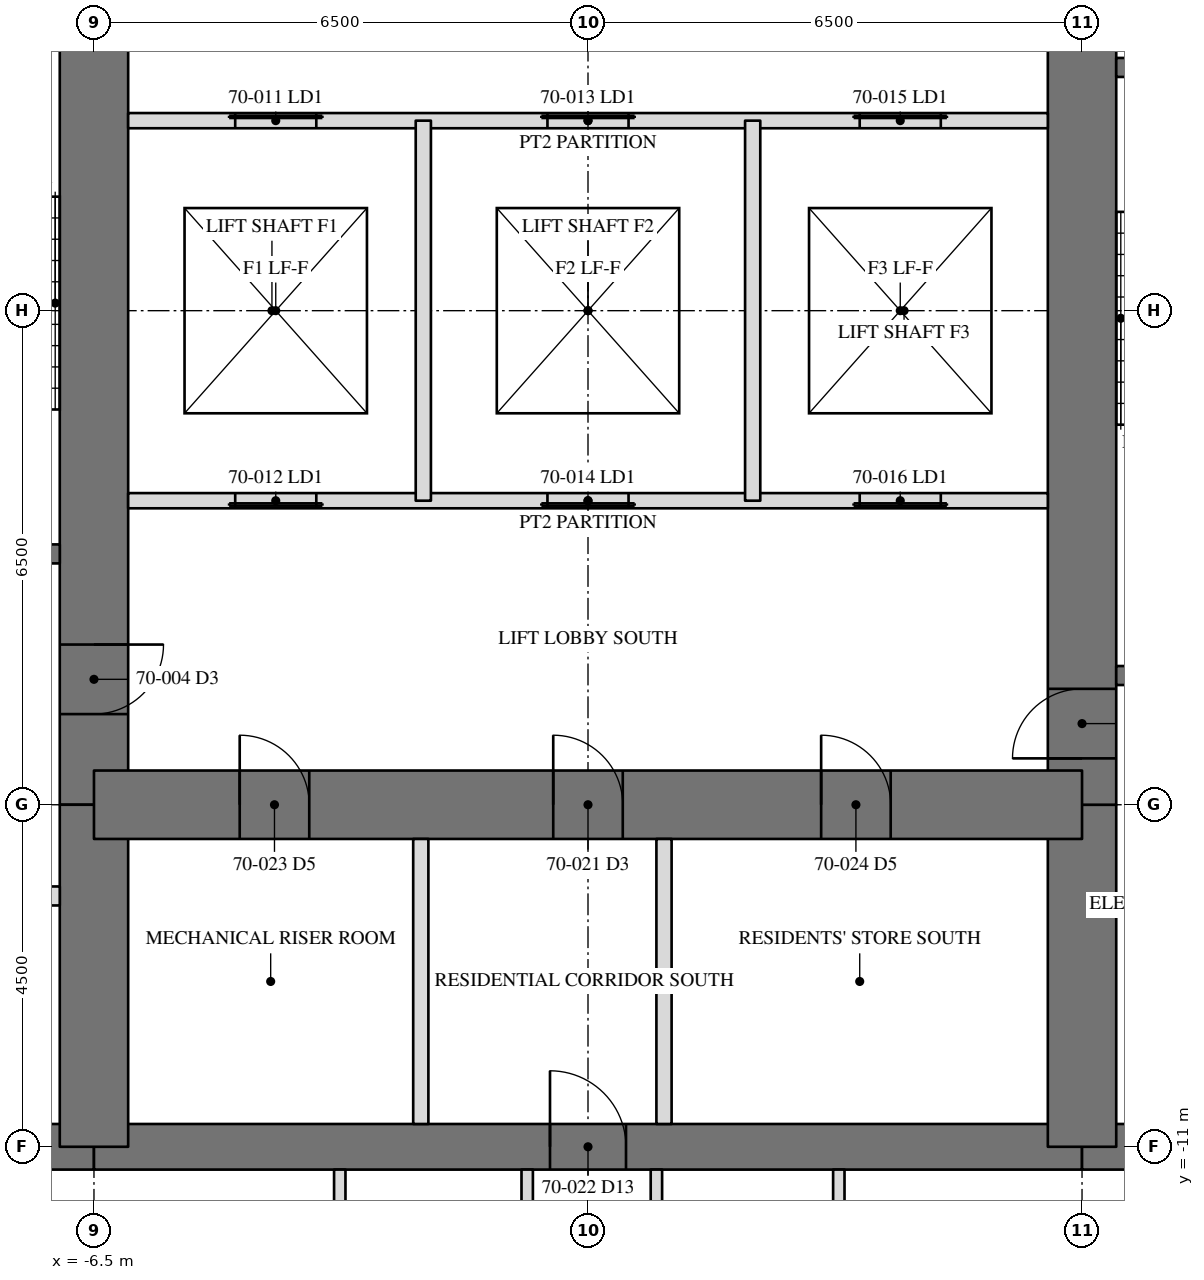
"""IFC4 building model, lengths in metres.
Left out: names, types, materials, properties, quantities, classifications, styles, units other than length and angle.
Written with IfcOpenShell. Run it as: python <this file> out.ifc"""

import sys

from ifc_helpers import new_model, si_unit, direction, frame, frame_2d, origin, place, context, subcontext, project, spatial, rectangle, extrude, element, fill, save


model = new_model("IFC4")
c1 = context("Model", 3, precision=1e-05, world=origin(), true_north=direction((0.0, 1.0)))
c2 = subcontext(c1, "Body", "Model", "MODEL_VIEW")
j1 = project(units=[si_unit("LENGTHUNIT", "METRE"), si_unit("PLANEANGLEUNIT", "RADIAN")], contexts=[c1])
p1 = place(None, origin())
s1 = spatial("IfcSite", under=j1, at=p1, CompositionType="ELEMENT")
p2 = place(p1, origin())
s2 = spatial("IfcBuilding", under=s1, at=p2, CompositionType="ELEMENT")
p3 = place(p2, frame((0.0, 0.0, 284.8)))
s3 = spatial("IfcBuildingStorey", under=s2, at=p3, CompositionType="ELEMENT", Elevation=284.8)
p4 = place(p3, frame((-11.0, -11.0, 0.0), z_axis=(0.0, 0.0, 1.0), x_axis=(1.0, 0.0, 0.0)))
e1 = element("IfcWall", 1, at=p4, inside=s3, PredefinedType="SHEAR", context=c2, shape_type="SweptSolid", body=[
    extrude(rectangle(XDim=4.5, YDim=0.6, at=frame_2d((2.25, 0.0))), origin(), (0.0, 0.0, 1.0), 3.6),
])
p5 = place(p3, frame((-6.5, -11.0, 0.0), z_axis=(0.0, 0.0, 1.0), x_axis=(1.0, 0.0, 0.0)))
e2 = element("IfcWall", 2, at=p5, inside=s3, PredefinedType="SHEAR", context=c2, shape_type="SweptSolid", body=[
    extrude(rectangle(XDim=13.0, YDim=0.6, at=frame_2d((6.5, 0.0))), origin(), (0.0, 0.0, 1.0), 3.6),
])
p6 = place(p5, frame((6.0, 0.0, 0.0)))
e3 = element("IfcOpeningElement", 3, at=p6, cuts=e2, PredefinedType="OPENING", context=c2, shape_type="SweptSolid", body=[
    extrude(rectangle(XDim=1.0, YDim=2.134, at=frame_2d((0.5, 1.067))), frame((0.0, 0.31, 0.0), z_axis=(0.0, -1.0, 0.0), x_axis=(1.0, 0.0, 0.0)), (0.0, 0.0, 1.0), 0.62),
])
p7 = place(p3, frame((6.5, -11.0, 0.0), z_axis=(0.0, 0.0, 1.0), x_axis=(1.0, 0.0, 0.0)))
e4 = element("IfcWall", 4, at=p7, inside=s3, PredefinedType="SHEAR", context=c2, shape_type="SweptSolid", body=[
    extrude(rectangle(XDim=4.5, YDim=0.6, at=frame_2d((2.25, 0.0))), origin(), (0.0, 0.0, 1.0), 3.6),
])
p8 = place(p3, frame((6.5, -11.0, 0.0), z_axis=(0.0, 0.0, 1.0), x_axis=(0.0, 1.0, 0.0)))
e5 = element("IfcWall", 5, at=p8, inside=s3, PredefinedType="SHEAR", context=c2, shape_type="SweptSolid", body=[
    extrude(rectangle(XDim=4.5, YDim=0.9, at=frame_2d((2.25, 0.0))), origin(), (0.0, 0.0, 1.0), 3.6),
])
p9 = place(p3, frame((6.5, -6.5, 0.0), z_axis=(0.0, 0.0, 1.0), x_axis=(0.0, 1.0, 0.0)))
e6 = element("IfcWall", 6, at=p9, inside=s3, PredefinedType="SHEAR", context=c2, shape_type="SweptSolid", body=[
    extrude(rectangle(XDim=13.0, YDim=0.9, at=frame_2d((6.5, 0.0))), origin(), (0.0, 0.0, 1.0), 3.6),
])
p10 = place(p9, frame((10.893, 0.0, 0.0)))
e7 = element("IfcOpeningElement", 7, at=p10, cuts=e6, PredefinedType="OPENING", context=c2, shape_type="SweptSolid", body=[
    extrude(rectangle(XDim=0.915, YDim=2.134, at=frame_2d((0.458, 1.067))), frame((0.0, 0.46, 0.0), z_axis=(0.0, -1.0, 0.0), x_axis=(1.0, 0.0, 0.0)), (0.0, 0.0, 1.0), 0.92),
])
p11 = place(p9, frame((0.61, 0.0, 0.0)))
e8 = element("IfcOpeningElement", 8, at=p11, cuts=e6, PredefinedType="OPENING", context=c2, shape_type="SweptSolid", body=[
    extrude(rectangle(XDim=0.915, YDim=2.134, at=frame_2d((0.458, 1.067))), frame((0.0, 0.46, 0.0), z_axis=(0.0, -1.0, 0.0), x_axis=(1.0, 0.0, 0.0)), (0.0, 0.0, 1.0), 0.92),
])
p12 = place(p3, frame((-6.5, 6.5, 0.0), z_axis=(0.0, 0.0, 1.0), x_axis=(0.0, -1.0, 0.0)))
e9 = element("IfcWall", 9, at=p12, inside=s3, PredefinedType="SHEAR", context=c2, shape_type="SweptSolid", body=[
    extrude(rectangle(XDim=13.0, YDim=0.9, at=frame_2d((6.5, 0.0))), origin(), (0.0, 0.0, 1.0), 3.6),
])
p13 = place(p12, frame((10.893, 0.0, 0.0)))
e10 = element("IfcOpeningElement", 10, at=p13, cuts=e9, PredefinedType="OPENING", context=c2, shape_type="SweptSolid", body=[
    extrude(rectangle(XDim=0.915, YDim=2.134, at=frame_2d((0.458, 1.067))), frame((0.0, 0.46, 0.0), z_axis=(0.0, -1.0, 0.0), x_axis=(1.0, 0.0, 0.0)), (0.0, 0.0, 1.0), 0.92),
])
p14 = place(p12, frame((0.61, 0.0, 0.0)))
e11 = element("IfcOpeningElement", 11, at=p14, cuts=e9, PredefinedType="OPENING", context=c2, shape_type="SweptSolid", body=[
    extrude(rectangle(XDim=0.915, YDim=2.134, at=frame_2d((0.458, 1.067))), frame((0.0, 0.46, 0.0), z_axis=(0.0, -1.0, 0.0), x_axis=(1.0, 0.0, 0.0)), (0.0, 0.0, 1.0), 0.92),
])
p15 = place(p3, frame((-6.5, -6.5, 0.0), z_axis=(0.0, 0.0, 1.0), x_axis=(0.0, -1.0, 0.0)))
e12 = element("IfcWall", 12, at=p15, inside=s3, PredefinedType="SHEAR", context=c2, shape_type="SweptSolid", body=[
    extrude(rectangle(XDim=4.5, YDim=0.9, at=frame_2d((2.25, 0.0))), origin(), (0.0, 0.0, 1.0), 3.6),
])
p16 = place(p3, frame((-6.5, -6.5, 0.0), z_axis=(0.0, 0.0, 1.0), x_axis=(1.0, 0.0, 0.0)))
e13 = element("IfcWall", 13, at=p16, inside=s3, PredefinedType="SHEAR", context=c2, shape_type="SweptSolid", body=[
    extrude(rectangle(XDim=13.0, YDim=0.9, at=frame_2d((6.5, 0.0))), origin(), (0.0, 0.0, 1.0), 3.6),
])
p17 = place(p16, frame((6.042, 0.0, 0.0)))
e14 = element("IfcOpeningElement", 14, at=p17, cuts=e13, PredefinedType="OPENING", context=c2, shape_type="SweptSolid", body=[
    extrude(rectangle(XDim=0.915, YDim=2.134, at=frame_2d((0.458, 1.067))), frame((0.0, 0.46, 0.0), z_axis=(0.0, -1.0, 0.0), x_axis=(1.0, 0.0, 0.0)), (0.0, 0.0, 1.0), 0.92),
])
p18 = place(p16, frame((1.917, 0.0, 0.0)))
e15 = element("IfcOpeningElement", 15, at=p18, cuts=e13, PredefinedType="OPENING", context=c2, shape_type="SweptSolid", body=[
    extrude(rectangle(XDim=0.915, YDim=2.134, at=frame_2d((0.458, 1.067))), frame((0.0, 0.46, 0.0), z_axis=(0.0, -1.0, 0.0), x_axis=(1.0, 0.0, 0.0)), (0.0, 0.0, 1.0), 0.92),
])
p19 = place(p16, frame((9.567, 0.0, 0.0)))
e16 = element("IfcOpeningElement", 16, at=p19, cuts=e13, PredefinedType="OPENING", context=c2, shape_type="SweptSolid", body=[
    extrude(rectangle(XDim=0.915, YDim=2.134, at=frame_2d((0.458, 1.067))), frame((0.0, 0.46, 0.0), z_axis=(0.0, -1.0, 0.0), x_axis=(1.0, 0.0, 0.0)), (0.0, 0.0, 1.0), 0.92),
])
p20 = place(p3, frame((6.95, -4.8, 0.0), z_axis=(0.0, 0.0, 1.0), x_axis=(1.0, 0.0, 0.0)))
e17 = element("IfcWall", 17, at=p20, inside=s3, PredefinedType="SOLIDWALL", context=c2, shape_type="SweptSolid", body=[
    extrude(rectangle(XDim=3.75, YDim=0.25, at=frame_2d((1.875, 0.0))), origin(), (0.0, 0.0, 1.0), 3.41),
])
p21 = place(p3, frame((6.95, 3.2, 0.0), z_axis=(0.0, 0.0, 1.0), x_axis=(1.0, 0.0, 0.0)))
e18 = element("IfcWall", 18, at=p21, inside=s3, PredefinedType="SOLIDWALL", context=c2, shape_type="SweptSolid", body=[
    extrude(rectangle(XDim=3.75, YDim=0.25, at=frame_2d((1.875, 0.0))), origin(), (0.0, 0.0, 1.0), 3.41),
])
p22 = place(p21, frame((1.342, 0.0, 0.0)))
e19 = element("IfcOpeningElement", 19, at=p22, cuts=e18, PredefinedType="OPENING", context=c2, shape_type="SweptSolid", body=[
    extrude(rectangle(XDim=1.067, YDim=2.134, at=frame_2d((0.533, 1.067))), frame((0.0, 0.135, 0.0), z_axis=(0.0, -1.0, 0.0), x_axis=(1.0, 0.0, 0.0)), (0.0, 0.0, 1.0), 0.27),
])
p23 = place(p3, frame((-6.95, -3.2, 0.0), z_axis=(0.0, 0.0, 1.0), x_axis=(-1.0, 0.0, 0.0)))
e20 = element("IfcWall", 20, at=p23, inside=s3, PredefinedType="SOLIDWALL", context=c2, shape_type="SweptSolid", body=[
    extrude(rectangle(XDim=3.75, YDim=0.25, at=frame_2d((1.875, 0.0))), origin(), (0.0, 0.0, 1.0), 3.41),
])
p24 = place(p23, frame((1.342, 0.0, 0.0)))
e21 = element("IfcOpeningElement", 21, at=p24, cuts=e20, PredefinedType="OPENING", context=c2, shape_type="SweptSolid", body=[
    extrude(rectangle(XDim=1.067, YDim=2.134, at=frame_2d((0.533, 1.067))), frame((0.0, 0.135, 0.0), z_axis=(0.0, -1.0, 0.0), x_axis=(1.0, 0.0, 0.0)), (0.0, 0.0, 1.0), 0.27),
])
p25 = place(p3, frame((-6.95, -7.7, 0.0), z_axis=(0.0, 0.0, 1.0), x_axis=(-1.0, 0.0, 0.0)))
e22 = element("IfcWall", 22, at=p25, inside=s3, PredefinedType="PARTITIONING", context=c2, shape_type="SweptSolid", body=[
    extrude(rectangle(XDim=3.75, YDim=0.25, at=frame_2d((1.875, 0.0))), origin(), (0.0, 0.0, 1.0), 3.41),
])
p26 = place(p25, frame((0.45, 0.0, 0.0)))
e23 = element("IfcOpeningElement", 23, at=p26, cuts=e22, PredefinedType="OPENING", context=c2, shape_type="SweptSolid", body=[
    extrude(rectangle(XDim=1.219, YDim=2.134, at=frame_2d((0.609, 1.067))), frame((0.0, 0.135, 0.0), z_axis=(0.0, -1.0, 0.0), x_axis=(1.0, 0.0, 0.0)), (0.0, 0.0, 1.0), 0.27),
])
p27 = place(p3, frame((-6.05, 2.5, 0.0), z_axis=(0.0, 0.0, 1.0), x_axis=(1.0, 0.0, 0.0)))
e24 = element("IfcWall", 24, at=p27, inside=s3, PredefinedType="PARTITIONING", context=c2, shape_type="SweptSolid", body=[
    extrude(rectangle(XDim=12.1, YDim=0.2, at=frame_2d((6.05, 0.0))), origin(), (0.0, 0.0, 1.0), 3.41),
])
p28 = place(p27, frame((1.408, 0.0, 0.0)))
e25 = element("IfcOpeningElement", 25, at=p28, cuts=e24, PredefinedType="OPENING", context=c2, shape_type="SweptSolid", body=[
    extrude(rectangle(XDim=1.067, YDim=2.134, at=frame_2d((0.533, 1.067))), frame((0.0, 0.11, 0.0), z_axis=(0.0, -1.0, 0.0), x_axis=(1.0, 0.0, 0.0)), (0.0, 0.0, 1.0), 0.22),
])
p29 = place(p27, frame((5.517, 0.0, 0.0)))
e26 = element("IfcOpeningElement", 26, at=p29, cuts=e24, PredefinedType="OPENING", context=c2, shape_type="SweptSolid", body=[
    extrude(rectangle(XDim=1.067, YDim=2.134, at=frame_2d((0.533, 1.067))), frame((0.0, 0.11, 0.0), z_axis=(0.0, -1.0, 0.0), x_axis=(1.0, 0.0, 0.0)), (0.0, 0.0, 1.0), 0.22),
])
p30 = place(p27, frame((9.625, 0.0, 0.0)))
e27 = element("IfcOpeningElement", 27, at=p30, cuts=e24, PredefinedType="OPENING", context=c2, shape_type="SweptSolid", body=[
    extrude(rectangle(XDim=1.067, YDim=2.134, at=frame_2d((0.533, 1.067))), frame((0.0, 0.11, 0.0), z_axis=(0.0, -1.0, 0.0), x_axis=(1.0, 0.0, 0.0)), (0.0, 0.0, 1.0), 0.22),
])
p31 = place(p3, frame((6.05, -2.5, 0.0), z_axis=(0.0, 0.0, 1.0), x_axis=(-1.0, 0.0, 0.0)))
e28 = element("IfcWall", 28, at=p31, inside=s3, PredefinedType="PARTITIONING", context=c2, shape_type="SweptSolid", body=[
    extrude(rectangle(XDim=12.1, YDim=0.2, at=frame_2d((6.05, 0.0))), origin(), (0.0, 0.0, 1.0), 3.41),
])
p32 = place(p31, frame((9.625, 0.0, 0.0)))
e29 = element("IfcOpeningElement", 29, at=p32, cuts=e28, PredefinedType="OPENING", context=c2, shape_type="SweptSolid", body=[
    extrude(rectangle(XDim=1.067, YDim=2.134, at=frame_2d((0.533, 1.067))), frame((0.0, 0.11, 0.0), z_axis=(0.0, -1.0, 0.0), x_axis=(1.0, 0.0, 0.0)), (0.0, 0.0, 1.0), 0.22),
])
p33 = place(p31, frame((5.517, 0.0, 0.0)))
e30 = element("IfcOpeningElement", 30, at=p33, cuts=e28, PredefinedType="OPENING", context=c2, shape_type="SweptSolid", body=[
    extrude(rectangle(XDim=1.067, YDim=2.134, at=frame_2d((0.533, 1.067))), frame((0.0, 0.11, 0.0), z_axis=(0.0, -1.0, 0.0), x_axis=(1.0, 0.0, 0.0)), (0.0, 0.0, 1.0), 0.22),
])
p34 = place(p31, frame((1.408, 0.0, 0.0)))
e31 = element("IfcOpeningElement", 31, at=p34, cuts=e28, PredefinedType="OPENING", context=c2, shape_type="SweptSolid", body=[
    extrude(rectangle(XDim=1.067, YDim=2.134, at=frame_2d((0.533, 1.067))), frame((0.0, 0.11, 0.0), z_axis=(0.0, -1.0, 0.0), x_axis=(1.0, 0.0, 0.0)), (0.0, 0.0, 1.0), 0.22),
])
for number, where, z_axis, x_axis in (
    (32, (-2.167, -2.5, 0.0), (0.0, 0.0, 1.0), (0.0, 1.0, 0.0)),
    (33, (2.167, -2.5, 0.0), (0.0, 0.0, 1.0), (0.0, 1.0, 0.0)),
):
    element("IfcWall", number, at=place(p3, frame(where, z_axis=z_axis, x_axis=x_axis)), inside=s3, PredefinedType="PARTITIONING", context=c2, shape_type="SweptSolid", body=[
        extrude(rectangle(XDim=5.0, YDim=0.2, at=frame_2d((2.5, 0.0))), origin(), (0.0, 0.0, 1.0), 3.41),
    ])
for number, where, z_axis, x_axis in (
    (34, (-2.2, -6.95, 0.0), (0.0, 0.0, 1.0), (0.0, -1.0, 0.0)),
    (35, (1.0, -6.95, 0.0), (0.0, 0.0, 1.0), (0.0, -1.0, 0.0)),
):
    element("IfcWall", number, at=place(p3, frame(where, z_axis=z_axis, x_axis=x_axis)), inside=s3, PredefinedType="PARTITIONING", context=c2, shape_type="SweptSolid", body=[
        extrude(rectangle(XDim=3.75, YDim=0.2, at=frame_2d((1.875, 0.0))), origin(), (0.0, 0.0, 1.0), 3.41),
    ])
p35 = place(p3, frame((-3.266, -11.3, 0.0), z_axis=(0.0, 0.0, 1.0), x_axis=(0.0, -1.0, 0.0)))
e36 = element("IfcWall", 36, at=p35, inside=s3, PredefinedType="PARTITIONING", context=c2, shape_type="SweptSolid", body=[
    extrude(rectangle(XDim=5.615, YDim=0.15, at=frame_2d((2.808, 0.0))), origin(), (0.0, 0.0, 1.0), 2.709),
])
p36 = place(p35, frame((3.242, 0.0, 0.0)))
e37 = element("IfcOpeningElement", 37, at=p36, cuts=e36, PredefinedType="OPENING", context=c2, shape_type="SweptSolid", body=[
    extrude(rectangle(XDim=0.915, YDim=2.134, at=frame_2d((0.458, 1.067))), frame((0.0, 0.085, 0.0), z_axis=(0.0, -1.0, 0.0), x_axis=(1.0, 0.0, 0.0)), (0.0, 0.0, 1.0), 0.17),
])
p37 = place(p3, frame((0.9, -11.3, 0.0), z_axis=(0.0, 0.0, 1.0), x_axis=(0.0, -1.0, 0.0)))
e38 = element("IfcWall", 38, at=p37, inside=s3, PredefinedType="PARTITIONING", context=c2, shape_type="SweptSolid", body=[
    extrude(rectangle(XDim=2.725, YDim=0.15, at=frame_2d((1.362, 0.0))), origin(), (0.0, 0.0, 1.0), 3.41),
])
p38 = place(p3, frame((3.3, -11.3, 0.0), z_axis=(0.0, 0.0, 1.0), x_axis=(0.0, -1.0, 0.0)))
e39 = element("IfcWall", 39, at=p38, inside=s3, PredefinedType="PARTITIONING", context=c2, shape_type="SweptSolid", body=[
    extrude(rectangle(XDim=2.725, YDim=0.15, at=frame_2d((1.362, 0.0))), origin(), (0.0, 0.0, 1.0), 2.709),
])
p39 = place(p3, frame((-0.8, -11.3, 0.0), z_axis=(0.0, 0.0, 1.0), x_axis=(0.0, -1.0, 0.0)))
e40 = element("IfcWall", 40, at=p39, inside=s3, PredefinedType="PARTITIONING", context=c2, shape_type="SweptSolid", body=[
    extrude(rectangle(XDim=2.375, YDim=0.15, at=frame_2d((1.188, 0.0))), origin(), (0.0, 0.0, 1.0), 3.41),
])
p40 = place(p13, origin())
e41 = element("IfcDoor", 41, at=p40, inside=s3, OperationType="SINGLE_SWING_RIGHT", PredefinedType="DOOR", context=c2, shape_type="SweptSolid", body=[
    extrude(rectangle(XDim=0.915, YDim=2.134, at=frame_2d((0.458, 1.067))), frame((0.0, -0.375, 0.0), z_axis=(0.0, -1.0, 0.0), x_axis=(1.0, 0.0, 0.0)), (0.0, 0.0, 1.0), 0.05),
])
fill(e10, e41)
p41 = place(p11, origin())
e42 = element("IfcDoor", 42, at=p41, inside=s3, OperationType="SINGLE_SWING_RIGHT", PredefinedType="DOOR", context=c2, shape_type="SweptSolid", body=[
    extrude(rectangle(XDim=0.915, YDim=2.134, at=frame_2d((0.458, 1.067))), frame((0.0, -0.375, 0.0), z_axis=(0.0, -1.0, 0.0), x_axis=(1.0, 0.0, 0.0)), (0.0, 0.0, 1.0), 0.05),
])
fill(e8, e42)
p42 = place(p28, origin())
e43 = element("IfcDoor", 43, at=p42, inside=s3, OperationType="SLIDING_TO_LEFT", PredefinedType="DOOR", context=c2, shape_type="SweptSolid", body=[
    extrude(rectangle(XDim=1.067, YDim=2.134, at=frame_2d((0.533, 1.067))), frame((0.0, 0.025, 0.0), z_axis=(0.0, -1.0, 0.0), x_axis=(1.0, 0.0, 0.0)), (0.0, 0.0, 1.0), 0.05),
])
fill(e25, e43)
p43 = place(p32, origin())
e44 = element("IfcDoor", 44, at=p43, inside=s3, OperationType="SLIDING_TO_LEFT", PredefinedType="DOOR", context=c2, shape_type="SweptSolid", body=[
    extrude(rectangle(XDim=1.067, YDim=2.134, at=frame_2d((0.533, 1.067))), frame((0.0, 0.025, 0.0), z_axis=(0.0, -1.0, 0.0), x_axis=(1.0, 0.0, 0.0)), (0.0, 0.0, 1.0), 0.05),
])
fill(e29, e44)
p44 = place(p29, origin())
e45 = element("IfcDoor", 45, at=p44, inside=s3, OperationType="SLIDING_TO_LEFT", PredefinedType="DOOR", context=c2, shape_type="SweptSolid", body=[
    extrude(rectangle(XDim=1.067, YDim=2.134, at=frame_2d((0.533, 1.067))), frame((0.0, 0.025, 0.0), z_axis=(0.0, -1.0, 0.0), x_axis=(1.0, 0.0, 0.0)), (0.0, 0.0, 1.0), 0.05),
])
fill(e26, e45)
p45 = place(p33, origin())
e46 = element("IfcDoor", 46, at=p45, inside=s3, OperationType="SLIDING_TO_LEFT", PredefinedType="DOOR", context=c2, shape_type="SweptSolid", body=[
    extrude(rectangle(XDim=1.067, YDim=2.134, at=frame_2d((0.533, 1.067))), frame((0.0, 0.025, 0.0), z_axis=(0.0, -1.0, 0.0), x_axis=(1.0, 0.0, 0.0)), (0.0, 0.0, 1.0), 0.05),
])
fill(e30, e46)
p46 = place(p30, origin())
e47 = element("IfcDoor", 47, at=p46, inside=s3, OperationType="SLIDING_TO_LEFT", PredefinedType="DOOR", context=c2, shape_type="SweptSolid", body=[
    extrude(rectangle(XDim=1.067, YDim=2.134, at=frame_2d((0.533, 1.067))), frame((0.0, 0.025, 0.0), z_axis=(0.0, -1.0, 0.0), x_axis=(1.0, 0.0, 0.0)), (0.0, 0.0, 1.0), 0.05),
])
fill(e27, e47)
p47 = place(p34, origin())
e48 = element("IfcDoor", 48, at=p47, inside=s3, OperationType="SLIDING_TO_LEFT", PredefinedType="DOOR", context=c2, shape_type="SweptSolid", body=[
    extrude(rectangle(XDim=1.067, YDim=2.134, at=frame_2d((0.533, 1.067))), frame((0.0, 0.025, 0.0), z_axis=(0.0, -1.0, 0.0), x_axis=(1.0, 0.0, 0.0)), (0.0, 0.0, 1.0), 0.05),
])
fill(e31, e48)
p48 = place(p17, origin())
e49 = element("IfcDoor", 49, at=p48, inside=s3, OperationType="SINGLE_SWING_RIGHT", PredefinedType="DOOR", context=c2, shape_type="SweptSolid", body=[
    extrude(rectangle(XDim=0.915, YDim=2.134, at=frame_2d((0.458, 1.067))), frame((0.0, -0.375, 0.0), z_axis=(0.0, -1.0, 0.0), x_axis=(1.0, 0.0, 0.0)), (0.0, 0.0, 1.0), 0.05),
])
fill(e14, e49)
p49 = place(p6, origin())
e50 = element("IfcDoor", 50, at=p49, inside=s3, OperationType="SINGLE_SWING_RIGHT", PredefinedType="DOOR", context=c2, shape_type="SweptSolid", body=[
    extrude(rectangle(XDim=1.0, YDim=2.134, at=frame_2d((0.5, 1.067))), frame((0.0, -0.225, 0.0), z_axis=(0.0, -1.0, 0.0), x_axis=(1.0, 0.0, 0.0)), (0.0, 0.0, 1.0), 0.05),
])
fill(e3, e50)
p50 = place(p18, origin())
e51 = element("IfcDoor", 51, at=p50, inside=s3, OperationType="SINGLE_SWING_RIGHT", PredefinedType="DOOR", context=c2, shape_type="SweptSolid", body=[
    extrude(rectangle(XDim=0.915, YDim=2.134, at=frame_2d((0.458, 1.067))), frame((0.0, -0.375, 0.0), z_axis=(0.0, -1.0, 0.0), x_axis=(1.0, 0.0, 0.0)), (0.0, 0.0, 1.0), 0.05),
])
fill(e15, e51)
p51 = place(p19, origin())
e52 = element("IfcDoor", 52, at=p51, inside=s3, OperationType="SINGLE_SWING_RIGHT", PredefinedType="DOOR", context=c2, shape_type="SweptSolid", body=[
    extrude(rectangle(XDim=0.915, YDim=2.134, at=frame_2d((0.458, 1.067))), frame((0.0, -0.375, 0.0), z_axis=(0.0, -1.0, 0.0), x_axis=(1.0, 0.0, 0.0)), (0.0, 0.0, 1.0), 0.05),
])
fill(e16, e52)
save(model, sys.argv[1])
